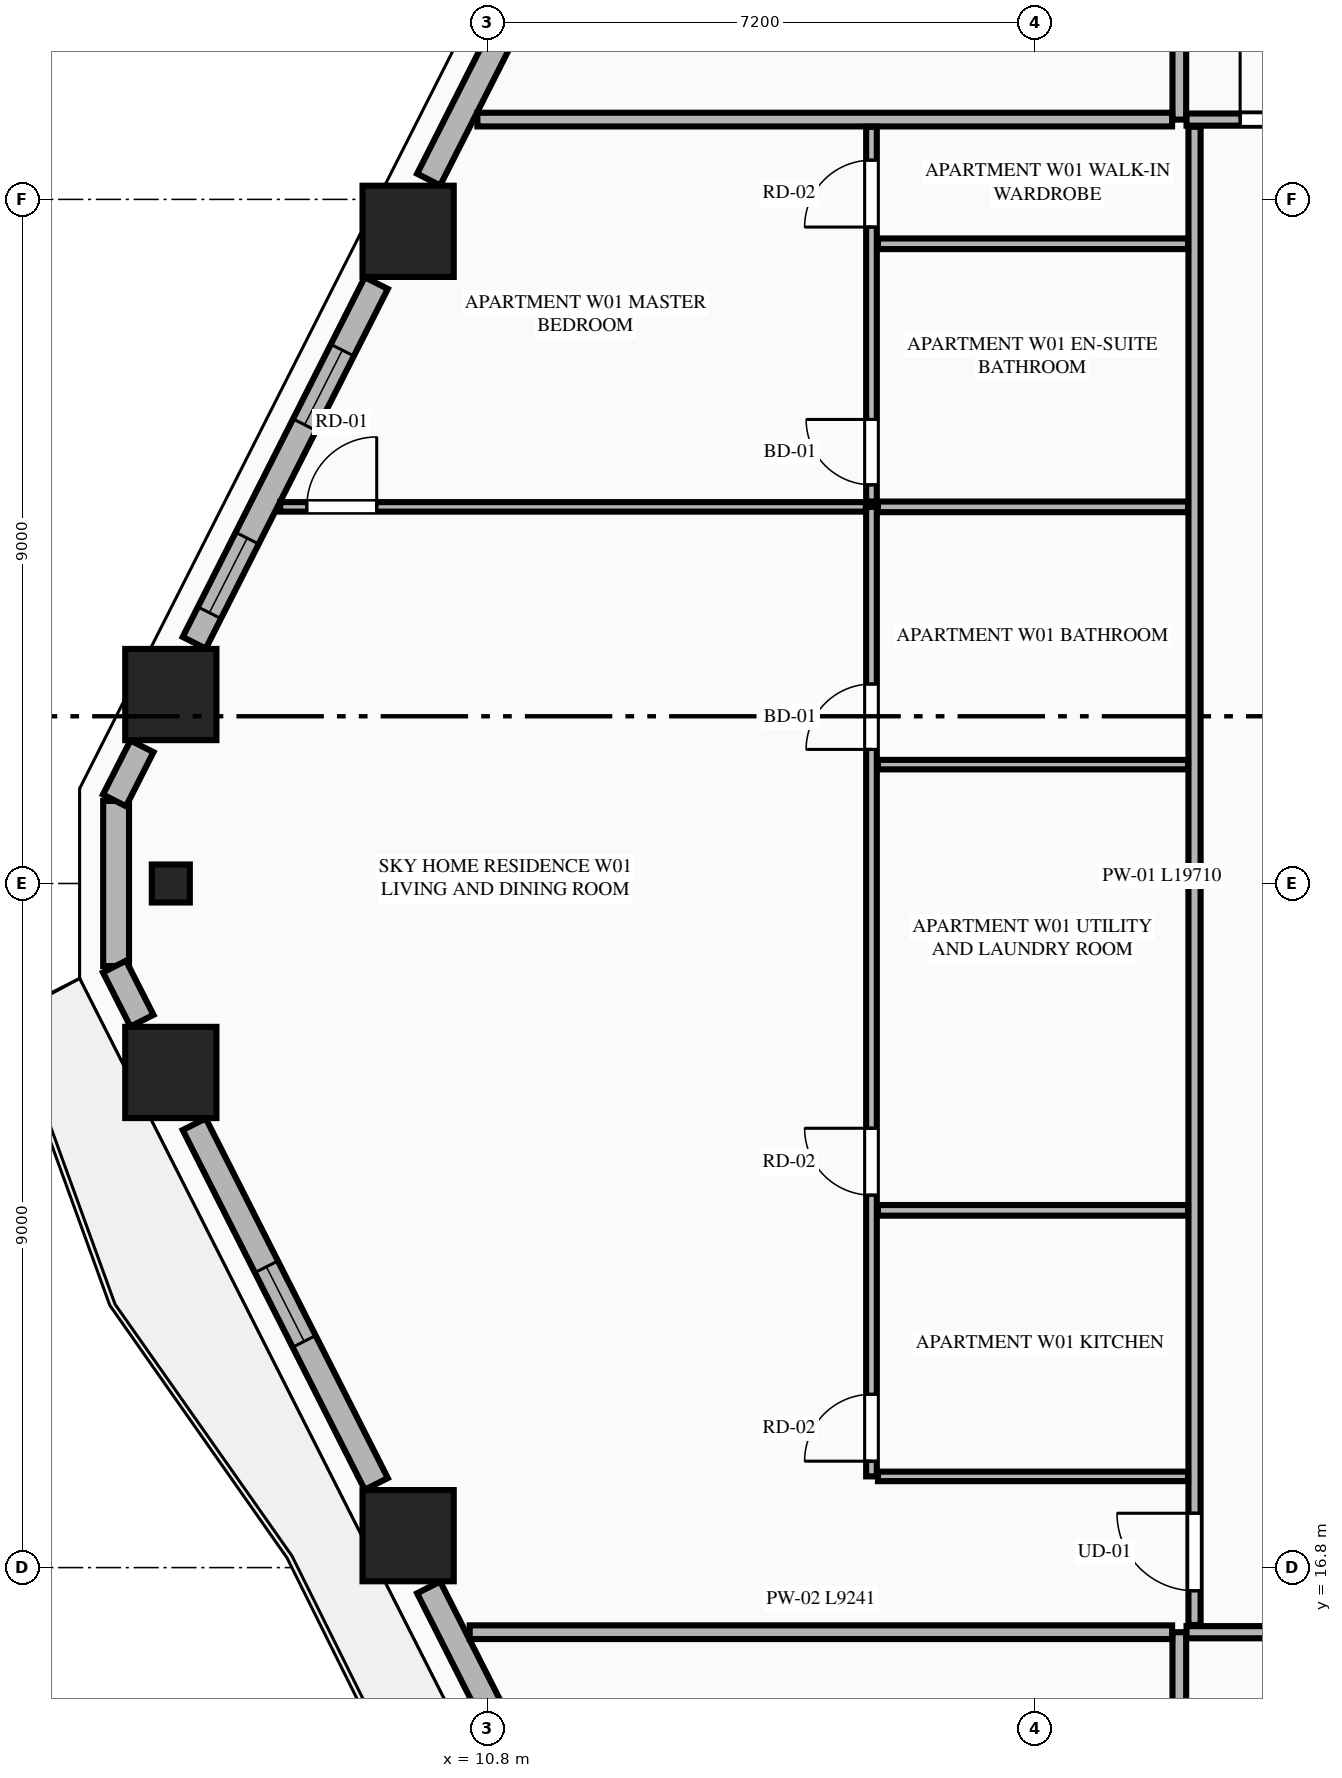
"""IFC4 building model, lengths in metres.
Left out: names, types, materials, properties, quantities, classifications, styles, units other than length and angle.
Written with IfcOpenShell. Run it as: python <this file> out.ifc"""

import sys

from ifc_helpers import new_model, si_unit, direction, frame, frame_2d, origin, origin_2d, place, context, subcontext, project, spatial, rectangle, extrude, element, fill, save


model = new_model("IFC4")
c1 = context("Model", 3, precision=1e-05, world=origin(), true_north=direction((0.0, 1.0)))
c2 = subcontext(c1, "Body", "Model", "MODEL_VIEW")
j1 = project(units=[si_unit("LENGTHUNIT", "METRE"), si_unit("PLANEANGLEUNIT", "RADIAN")], contexts=[c1])
p1 = place(None, origin())
s1 = spatial("IfcSite", under=j1, at=p1, CompositionType="ELEMENT")
p2 = place(p1, origin())
s2 = spatial("IfcBuilding", under=s1, at=p2, CompositionType="ELEMENT")
p3 = place(p2, frame((0.0, 0.0, 46.2)))
s3 = spatial("IfcBuildingStorey", under=s2, at=p3, CompositionType="ELEMENT", Elevation=46.2)
for number, where, z_axis, x_axis in (
    (1, (9.754, 34.38, 0.0), (0.0, 0.0, 1.0), (1.0, 0.0, 0.0)),
    (2, (6.632, 28.286, 0.0), (0.0, 0.0, 1.0), (1.0, 0.0, 0.0)),
    (3, (6.632, 23.314, 0.0), (0.0, 0.0, 1.0), (1.0, 0.0, 0.0)),
    (4, (9.754, 17.22, 0.0), (0.0, 0.0, 1.0), (1.0, 0.0, 0.0)),
):
    element("IfcColumn", number, at=place(p3, frame(where, z_axis=z_axis, x_axis=x_axis)), inside=s3, PredefinedType="COLUMN", context=c2, shape_type="SweptSolid", body=[
        extrude(rectangle(XDim=1.2, YDim=1.2, at=origin_2d()), origin(), (0.0, 0.0, 1.0), 3.55),
    ])
p4 = place(p3, frame((6.632, 25.8, 0.0), z_axis=(0.0, 0.0, 1.0), x_axis=(0.0, -1.0, 0.0)))
e5 = element("IfcColumn", 5, at=p4, inside=s3, PredefinedType="PILASTER", context=c2, shape_type="SweptSolid", body=[
    extrude(rectangle(XDim=0.5, YDim=0.35, at=origin_2d()), origin(), (0.0, 0.0, 1.0), 3.55),
])
p5 = place(p3, frame((5.912, 26.886, 0.0), z_axis=(0.0, 0.0, 1.0), x_axis=(0.0, -1.0, 0.0)))
e6 = element("IfcWall", 6, at=p5, inside=s3, PredefinedType="STANDARD", context=c2, shape_type="SweptSolid", body=[
    extrude(rectangle(XDim=2.172, YDim=0.34, at=frame_2d((1.086, 0.0))), origin(), (0.0, 0.0, 1.0), 3.33),
])
p6 = place(p3, frame((12.529, 40.01, 0.0), z_axis=(0.0, 0.0, 1.0), x_axis=(-0.451627137896, -0.892206774417, 0.0)))
e7 = element("IfcWall", 7, at=p6, inside=s3, PredefinedType="STANDARD", context=c2, shape_type="SweptSolid", body=[
    extrude(rectangle(XDim=5.547, YDim=0.34, at=frame_2d((2.773, 0.0))), origin(), (0.0, 0.0, 1.0), 2.787),
])
p7 = place(p6, frame((2.223, 0.0, 0.75)))
e8 = element("IfcOpeningElement", 8, at=p7, cuts=e7, PredefinedType="OPENING", context=c2, shape_type="SweptSolid", body=[
    extrude(rectangle(XDim=1.1, YDim=1.887, at=frame_2d((0.55, 0.943))), frame((0.0, 0.18, 0.0), z_axis=(0.0, -1.0, 0.0), x_axis=(1.0, 0.0, 0.0)), (0.0, 0.0, 1.0), 0.36),
])
p8 = place(p3, frame((9.335, 33.699, 0.0), z_axis=(0.0, 0.0, 1.0), x_axis=(-0.451590635984, -0.892225250422, 0.0)))
e9 = element("IfcWall", 9, at=p8, inside=s3, PredefinedType="STANDARD", context=c2, shape_type="SweptSolid", body=[
    extrude(rectangle(XDim=5.303, YDim=0.34, at=frame_2d((2.652, 0.0))), origin(), (0.0, 0.0, 1.0), 2.787),
])
p9 = place(p8, frame((0.989, 0.0, 0.75)))
e10 = element("IfcOpeningElement", 10, at=p9, cuts=e9, PredefinedType="OPENING", context=c2, shape_type="SweptSolid", body=[
    extrude(rectangle(XDim=1.1, YDim=1.887, at=frame_2d((0.55, 0.943))), frame((0.0, 0.18, 0.0), z_axis=(0.0, -1.0, 0.0), x_axis=(1.0, 0.0, 0.0)), (0.0, 0.0, 1.0), 0.36),
])
p10 = place(p8, frame((3.761, 0.0, 0.75)))
e11 = element("IfcOpeningElement", 11, at=p10, cuts=e9, PredefinedType="OPENING", context=c2, shape_type="SweptSolid", body=[
    extrude(rectangle(XDim=1.1, YDim=1.887, at=frame_2d((0.55, 0.943))), frame((0.0, 0.18, 0.0), z_axis=(0.0, -1.0, 0.0), x_axis=(1.0, 0.0, 0.0)), (0.0, 0.0, 1.0), 0.36),
])
for number, where, z_axis, x_axis in (
    (12, (6.252, 27.605, 0.0), (0.0, 0.0, 1.0), (-0.452, -0.892, 0.0)),
    (13, (5.891, 24.707, 0.0), (0.0, 0.0, 1.0), (0.452, -0.892, 0.0)),
):
    element("IfcWall", number, at=place(p3, frame(where, z_axis=z_axis, x_axis=x_axis)), inside=s3, PredefinedType="STANDARD", context=c2, shape_type="SweptSolid", body=[
        extrude(rectangle(XDim=0.798, YDim=0.34, at=frame_2d((0.399, 0.0))), origin(), (0.0, 0.0, 1.0), 3.33),
    ])
p11 = place(p3, frame((6.94, 22.633, 0.0), z_axis=(0.0, 0.0, 1.0), x_axis=(0.451572088722, -0.892234637686, 0.0)))
e14 = element("IfcWall", 14, at=p11, inside=s3, PredefinedType="STANDARD", context=c2, shape_type="SweptSolid", body=[
    extrude(rectangle(XDim=5.304, YDim=0.34, at=frame_2d((2.652, 0.0))), origin(), (0.0, 0.0, 1.0), 2.787),
])
p12 = place(p11, frame((2.102, 0.0, 0.75)))
e15 = element("IfcOpeningElement", 15, at=p12, cuts=e14, PredefinedType="OPENING", context=c2, shape_type="SweptSolid", body=[
    extrude(rectangle(XDim=1.1, YDim=1.887, at=frame_2d((0.55, 0.943))), frame((0.0, 0.18, 0.0), z_axis=(0.0, -1.0, 0.0), x_axis=(1.0, 0.0, 0.0)), (0.0, 0.0, 1.0), 0.36),
])
p13 = place(p3, frame((10.024, 16.539, 0.0), z_axis=(0.0, 0.0, 1.0), x_axis=(0.451627137896, -0.892206774417, 0.0)))
e16 = element("IfcWall", 16, at=p13, inside=s3, PredefinedType="STANDARD", context=c2, shape_type="SweptSolid", body=[
    extrude(rectangle(XDim=5.547, YDim=0.34, at=frame_2d((2.773, 0.0))), origin(), (0.0, 0.0, 1.0), 2.787),
])
p14 = place(p13, frame((2.679, 0.0, 0.0)))
e17 = element("IfcOpeningElement", 17, at=p14, cuts=e16, PredefinedType="OPENING", context=c2, shape_type="SweptSolid", body=[
    extrude(rectangle(XDim=1.1, YDim=2.25, at=frame_2d((0.55, 1.125))), frame((0.0, 0.18, 0.0), z_axis=(0.0, -1.0, 0.0), x_axis=(1.0, 0.0, 0.0)), (0.0, 0.0, 1.0), 0.36),
])
p15 = place(p3, frame((19.9, 2.455, 0.0), z_axis=(0.0, 0.0, 1.0), x_axis=(0.0, 1.0, 0.0)))
e18 = element("IfcWall", 18, at=p15, inside=s3, PredefinedType="PARTITIONING", context=c2, shape_type="SweptSolid", body=[
    extrude(rectangle(XDim=13.495, YDim=0.18, at=frame_2d((6.748, 0.0))), origin(), (0.0, 0.0, 1.0), 3.33),
])
p16 = place(p3, frame((19.995, 15.95, 0.0), z_axis=(0.0, 0.0, 1.0), x_axis=(1.0, 0.0, 0.0)))
e19 = element("IfcWall", 19, at=p16, inside=s3, PredefinedType="PARTITIONING", context=c2, shape_type="SweptSolid", body=[
    extrude(rectangle(XDim=24.81, YDim=0.16, at=frame_2d((12.405, 0.0))), origin(), (0.0, 0.0, 1.0), 3.33),
])
p17 = place(p16, frame((22.605, 0.0, 0.0)))
e20 = element("IfcOpeningElement", 20, at=p17, cuts=e19, PredefinedType="OPENING", context=c2, shape_type="SweptSolid", body=[
    extrude(rectangle(XDim=1.02, YDim=2.25, at=frame_2d((0.51, 1.125))), frame((0.0, 0.09, 0.0), z_axis=(0.0, -1.0, 0.0), x_axis=(1.0, 0.0, 0.0)), (0.0, 0.0, 1.0), 0.18),
])
p18 = place(p3, frame((19.9, 35.85, 0.0), z_axis=(0.0, 0.0, 1.0), x_axis=(0.0, 1.0, 0.0)))
e21 = element("IfcWall", 21, at=p18, inside=s3, PredefinedType="PARTITIONING", context=c2, shape_type="SweptSolid", body=[
    extrude(rectangle(XDim=13.295, YDim=0.18, at=frame_2d((6.647, 0.0))), origin(), (0.0, 0.0, 1.0), 3.33),
])
p19 = place(p3, frame((19.995, 35.85, 0.0), z_axis=(0.0, 0.0, 1.0), x_axis=(1.0, 0.0, 0.0)))
e22 = element("IfcWall", 22, at=p19, inside=s3, PredefinedType="PARTITIONING", context=c2, shape_type="SweptSolid", body=[
    extrude(rectangle(XDim=8.188, YDim=0.16, at=frame_2d((4.094, 0.0))), origin(), (0.0, 0.0, 1.0), 3.33),
])
p20 = place(p19, frame((0.705, 0.0, 0.0)))
e23 = element("IfcOpeningElement", 23, at=p20, cuts=e22, PredefinedType="OPENING", context=c2, shape_type="SweptSolid", body=[
    extrude(rectangle(XDim=1.02, YDim=2.25, at=frame_2d((0.51, 1.125))), frame((0.0, 0.09, 0.0), z_axis=(0.0, -1.0, 0.0), x_axis=(1.0, 0.0, 0.0)), (0.0, 0.0, 1.0), 0.18),
])
p21 = place(p3, frame((10.564, 15.95, 0.0), z_axis=(0.0, 0.0, 1.0), x_axis=(1.0, 0.0, 0.0)))
e24 = element("IfcWall", 24, at=p21, inside=s3, PredefinedType="PARTITIONING", context=c2, shape_type="SweptSolid", body=[
    extrude(rectangle(XDim=9.241, YDim=0.18, at=frame_2d((4.621, 0.0))), origin(), (0.0, 0.0, 1.0), 3.33),
])
p22 = place(p3, frame((10.665, 35.85, 0.0), z_axis=(0.0, 0.0, 1.0), x_axis=(1.0, 0.0, 0.0)))
e25 = element("IfcWall", 25, at=p22, inside=s3, PredefinedType="PARTITIONING", context=c2, shape_type="SweptSolid", body=[
    extrude(rectangle(XDim=9.14, YDim=0.18, at=frame_2d((4.57, 0.0))), origin(), (0.0, 0.0, 1.0), 3.33),
])
p23 = place(p3, frame((20.1, 16.045, 0.0), z_axis=(0.0, 0.0, 1.0), x_axis=(0.0, 1.0, 0.0)))
e26 = element("IfcWall", 26, at=p23, inside=s3, PredefinedType="PARTITIONING", context=c2, shape_type="SweptSolid", body=[
    extrude(rectangle(XDim=19.71, YDim=0.16, at=frame_2d((9.855, 0.0))), origin(), (0.0, 0.0, 1.0), 3.33),
])
p24 = place(p23, frame((0.45, 0.0, 0.0)))
e27 = element("IfcOpeningElement", 27, at=p24, cuts=e26, PredefinedType="OPENING", context=c2, shape_type="SweptSolid", body=[
    extrude(rectangle(XDim=1.02, YDim=2.25, at=frame_2d((0.51, 1.125))), frame((0.0, 0.09, 0.0), z_axis=(0.0, -1.0, 0.0), x_axis=(1.0, 0.0, 0.0)), (0.0, 0.0, 1.0), 0.18),
])
p25 = place(p3, frame((15.935, 18.0, 0.0), z_axis=(0.0, 0.0, 1.0), x_axis=(1.0, 0.0, 0.0)))
e28 = element("IfcWall", 28, at=p25, inside=s3, PredefinedType="PARTITIONING", context=c2, shape_type="SweptSolid", body=[
    extrude(rectangle(XDim=4.08, YDim=0.125, at=frame_2d((2.04, 0.0))), origin(), (0.0, 0.0, 1.0), 2.637),
])
p26 = place(p3, frame((15.85, 18.0, 0.0), z_axis=(0.0, 0.0, 1.0), x_axis=(0.0, 1.0, 0.0)))
e29 = element("IfcWall", 29, at=p26, inside=s3, PredefinedType="PLUMBINGWALL", context=c2, shape_type="SweptSolid", body=[
    extrude(rectangle(XDim=12.755, YDim=0.14, at=frame_2d((6.377, 0.0))), origin(), (0.0, 0.0, 1.0), 3.33),
])
p27 = place(p26, frame((0.2, 0.0, 0.0)))
e30 = element("IfcOpeningElement", 30, at=p27, cuts=e29, PredefinedType="OPENING", context=c2, shape_type="SweptSolid", body=[
    extrude(rectangle(XDim=0.88, YDim=2.15, at=frame_2d((0.44, 1.075))), frame((0.0, 0.08, 0.0), z_axis=(0.0, -1.0, 0.0), x_axis=(1.0, 0.0, 0.0)), (0.0, 0.0, 1.0), 0.16),
])
p28 = place(p26, frame((3.7, 0.0, 0.0)))
e31 = element("IfcOpeningElement", 31, at=p28, cuts=e29, PredefinedType="OPENING", context=c2, shape_type="SweptSolid", body=[
    extrude(rectangle(XDim=0.88, YDim=2.15, at=frame_2d((0.44, 1.075))), frame((0.0, 0.08, 0.0), z_axis=(0.0, -1.0, 0.0), x_axis=(1.0, 0.0, 0.0)), (0.0, 0.0, 1.0), 0.16),
])
p29 = place(p26, frame((9.564, 0.0, 0.0)))
e32 = element("IfcOpeningElement", 32, at=p29, cuts=e29, PredefinedType="OPENING", context=c2, shape_type="SweptSolid", body=[
    extrude(rectangle(XDim=0.86, YDim=2.1, at=frame_2d((0.43, 1.05))), frame((0.0, 0.08, 0.0), z_axis=(0.0, -1.0, 0.0), x_axis=(1.0, 0.0, 0.0)), (0.0, 0.0, 1.0), 0.16),
])
p30 = place(p3, frame((15.85, 30.825, 0.0), z_axis=(0.0, 0.0, 1.0), x_axis=(0.0, 1.0, 0.0)))
e33 = element("IfcWall", 33, at=p30, inside=s3, PredefinedType="PLUMBINGWALL", context=c2, shape_type="SweptSolid", body=[
    extrude(rectangle(XDim=4.93, YDim=0.14, at=frame_2d((2.465, 0.0))), origin(), (0.0, 0.0, 1.0), 3.33),
])
p31 = place(p30, frame((0.22, 0.0, 0.0)))
e34 = element("IfcOpeningElement", 34, at=p31, cuts=e33, PredefinedType="OPENING", context=c2, shape_type="SweptSolid", body=[
    extrude(rectangle(XDim=0.86, YDim=2.1, at=frame_2d((0.43, 1.05))), frame((0.0, 0.08, 0.0), z_axis=(0.0, -1.0, 0.0), x_axis=(1.0, 0.0, 0.0)), (0.0, 0.0, 1.0), 0.16),
])
p32 = place(p30, frame((3.611, 0.0, 0.0)))
e35 = element("IfcOpeningElement", 35, at=p32, cuts=e33, PredefinedType="OPENING", context=c2, shape_type="SweptSolid", body=[
    extrude(rectangle(XDim=0.88, YDim=2.15, at=frame_2d((0.44, 1.075))), frame((0.0, 0.08, 0.0), z_axis=(0.0, -1.0, 0.0), x_axis=(1.0, 0.0, 0.0)), (0.0, 0.0, 1.0), 0.16),
])
p33 = place(p3, frame((15.935, 30.755, 0.0), z_axis=(0.0, 0.0, 1.0), x_axis=(1.0, 0.0, 0.0)))
e36 = element("IfcWall", 36, at=p33, inside=s3, PredefinedType="PLUMBINGWALL", context=c2, shape_type="SweptSolid", body=[
    extrude(rectangle(XDim=4.08, YDim=0.14, at=frame_2d((2.04, 0.0))), origin(), (0.0, 0.0, 1.0), 3.33),
])
p34 = place(p3, frame((8.071, 30.755, 0.0), z_axis=(0.0, 0.0, 1.0), x_axis=(1.0, 0.0, 0.0)))
e37 = element("IfcWall", 37, at=p34, inside=s3, PredefinedType="PARTITIONING", context=c2, shape_type="SweptSolid", body=[
    extrude(rectangle(XDim=7.704, YDim=0.125, at=frame_2d((3.852, 0.0))), origin(), (0.0, 0.0, 1.0), 3.33),
])
p35 = place(p34, frame((0.35, 0.0, 0.0)))
e38 = element("IfcOpeningElement", 38, at=p35, cuts=e37, PredefinedType="OPENING", context=c2, shape_type="SweptSolid", body=[
    extrude(rectangle(XDim=0.92, YDim=2.15, at=frame_2d((0.46, 1.075))), frame((0.0, 0.073, 0.0), z_axis=(0.0, -1.0, 0.0), x_axis=(1.0, 0.0, 0.0)), (0.0, 0.0, 1.0), 0.145),
])
p36 = place(p3, frame((15.935, 21.5, 0.0), z_axis=(0.0, 0.0, 1.0), x_axis=(1.0, 0.0, 0.0)))
e39 = element("IfcWall", 39, at=p36, inside=s3, PredefinedType="PLUMBINGWALL", context=c2, shape_type="SweptSolid", body=[
    extrude(rectangle(XDim=4.08, YDim=0.14, at=frame_2d((2.04, 0.0))), origin(), (0.0, 0.0, 1.0), 3.33),
])
p37 = place(p3, frame((15.935, 27.364, 0.0), z_axis=(0.0, 0.0, 1.0), x_axis=(1.0, 0.0, 0.0)))
e40 = element("IfcWall", 40, at=p37, inside=s3, PredefinedType="PARTITIONING", context=c2, shape_type="SweptSolid", body=[
    extrude(rectangle(XDim=4.08, YDim=0.125, at=frame_2d((2.04, 0.0))), origin(), (0.0, 0.0, 1.0), 3.33),
])
p38 = place(p3, frame((15.935, 34.216, 0.0), z_axis=(0.0, 0.0, 1.0), x_axis=(1.0, 0.0, 0.0)))
e41 = element("IfcWall", 41, at=p38, inside=s3, PredefinedType="PLUMBINGWALL", context=c2, shape_type="SweptSolid", body=[
    extrude(rectangle(XDim=4.08, YDim=0.14, at=frame_2d((2.04, 0.0))), origin(), (0.0, 0.0, 1.0), 2.637),
])
p39 = place(p9, origin())
e42 = element("IfcWindow", 42, at=p39, inside=s3, PartitioningType="SINGLE_PANEL", PredefinedType="WINDOW", context=c2, shape_type="SweptSolid", body=[
    extrude(rectangle(XDim=1.1, YDim=1.887, at=frame_2d((0.55, 0.943))), frame((0.0, 0.03, 0.0), z_axis=(0.0, -1.0, 0.0), x_axis=(1.0, 0.0, 0.0)), (0.0, 0.0, 1.0), 0.06),
])
fill(e10, e42)
p40 = place(p12, origin())
e43 = element("IfcWindow", 43, at=p40, inside=s3, PartitioningType="SINGLE_PANEL", PredefinedType="WINDOW", context=c2, shape_type="SweptSolid", body=[
    extrude(rectangle(XDim=1.1, YDim=1.887, at=frame_2d((0.55, 0.943))), frame((0.0, 0.03, 0.0), z_axis=(0.0, -1.0, 0.0), x_axis=(1.0, 0.0, 0.0)), (0.0, 0.0, 1.0), 0.06),
])
fill(e15, e43)
p41 = place(p20, origin())
e44 = element("IfcDoor", 44, at=p41, inside=s3, OperationType="SINGLE_SWING_LEFT", PredefinedType="DOOR", context=c2, shape_type="SweptSolid", body=[
    extrude(rectangle(XDim=1.02, YDim=2.25, at=frame_2d((0.51, 1.125))), frame((0.0, 0.025, 0.0), z_axis=(0.0, -1.0, 0.0), x_axis=(1.0, 0.0, 0.0)), (0.0, 0.0, 1.0), 0.05),
])
fill(e23, e44)
p42 = place(p27, origin())
e45 = element("IfcDoor", 45, at=p42, inside=s3, OperationType="SINGLE_SWING_LEFT", PredefinedType="DOOR", context=c2, shape_type="SweptSolid", body=[
    extrude(rectangle(XDim=0.88, YDim=2.15, at=frame_2d((0.44, 1.075))), frame((0.0, 0.025, 0.0), z_axis=(0.0, -1.0, 0.0), x_axis=(1.0, 0.0, 0.0)), (0.0, 0.0, 1.0), 0.05),
])
fill(e30, e45)
p43 = place(p28, origin())
e46 = element("IfcDoor", 46, at=p43, inside=s3, OperationType="SINGLE_SWING_RIGHT", PredefinedType="DOOR", context=c2, shape_type="SweptSolid", body=[
    extrude(rectangle(XDim=0.88, YDim=2.15, at=frame_2d((0.44, 1.075))), frame((0.0, 0.025, 0.0), z_axis=(0.0, -1.0, 0.0), x_axis=(1.0, 0.0, 0.0)), (0.0, 0.0, 1.0), 0.05),
])
fill(e31, e46)
p44 = place(p29, origin())
e47 = element("IfcDoor", 47, at=p44, inside=s3, OperationType="SINGLE_SWING_LEFT", PredefinedType="DOOR", context=c2, shape_type="SweptSolid", body=[
    extrude(rectangle(XDim=0.86, YDim=2.1, at=frame_2d((0.43, 1.05))), frame((0.0, 0.025, 0.0), z_axis=(0.0, -1.0, 0.0), x_axis=(1.0, 0.0, 0.0)), (0.0, 0.0, 1.0), 0.05),
])
fill(e32, e47)
p45 = place(p31, origin())
e48 = element("IfcDoor", 48, at=p45, inside=s3, OperationType="SINGLE_SWING_RIGHT", PredefinedType="DOOR", context=c2, shape_type="SweptSolid", body=[
    extrude(rectangle(XDim=0.86, YDim=2.1, at=frame_2d((0.43, 1.05))), frame((0.0, 0.025, 0.0), z_axis=(0.0, -1.0, 0.0), x_axis=(1.0, 0.0, 0.0)), (0.0, 0.0, 1.0), 0.05),
])
fill(e34, e48)
p46 = place(p32, origin())
e49 = element("IfcDoor", 49, at=p46, inside=s3, OperationType="SINGLE_SWING_LEFT", PredefinedType="DOOR", context=c2, shape_type="SweptSolid", body=[
    extrude(rectangle(XDim=0.88, YDim=2.15, at=frame_2d((0.44, 1.075))), frame((0.0, 0.025, 0.0), z_axis=(0.0, -1.0, 0.0), x_axis=(1.0, 0.0, 0.0)), (0.0, 0.0, 1.0), 0.05),
])
fill(e35, e49)
p47 = place(p24, origin())
e50 = element("IfcDoor", 50, at=p47, inside=s3, OperationType="SINGLE_SWING_RIGHT", PredefinedType="DOOR", context=c2, shape_type="SweptSolid", body=[
    extrude(rectangle(XDim=1.02, YDim=2.25, at=frame_2d((0.51, 1.125))), frame((0.0, 0.025, 0.0), z_axis=(0.0, -1.0, 0.0), x_axis=(1.0, 0.0, 0.0)), (0.0, 0.0, 1.0), 0.05),
])
fill(e27, e50)
p48 = place(p35, origin())
e51 = element("IfcDoor", 51, at=p48, inside=s3, OperationType="SINGLE_SWING_RIGHT", PredefinedType="DOOR", context=c2, shape_type="SweptSolid", body=[
    extrude(rectangle(XDim=0.92, YDim=2.15, at=frame_2d((0.46, 1.075))), frame((0.0, 0.025, 0.0), z_axis=(0.0, -1.0, 0.0), x_axis=(1.0, 0.0, 0.0)), (0.0, 0.0, 1.0), 0.05),
])
fill(e38, e51)
p49 = place(p10, origin())
e52 = element("IfcWindow", 52, at=p49, inside=s3, PartitioningType="SINGLE_PANEL", PredefinedType="WINDOW", context=c2, shape_type="SweptSolid", body=[
    extrude(rectangle(XDim=1.1, YDim=1.887, at=frame_2d((0.55, 0.943))), frame((0.0, 0.03, 0.0), z_axis=(0.0, -1.0, 0.0), x_axis=(1.0, 0.0, 0.0)), (0.0, 0.0, 1.0), 0.06),
])
fill(e11, e52)
save(model, sys.argv[1])
